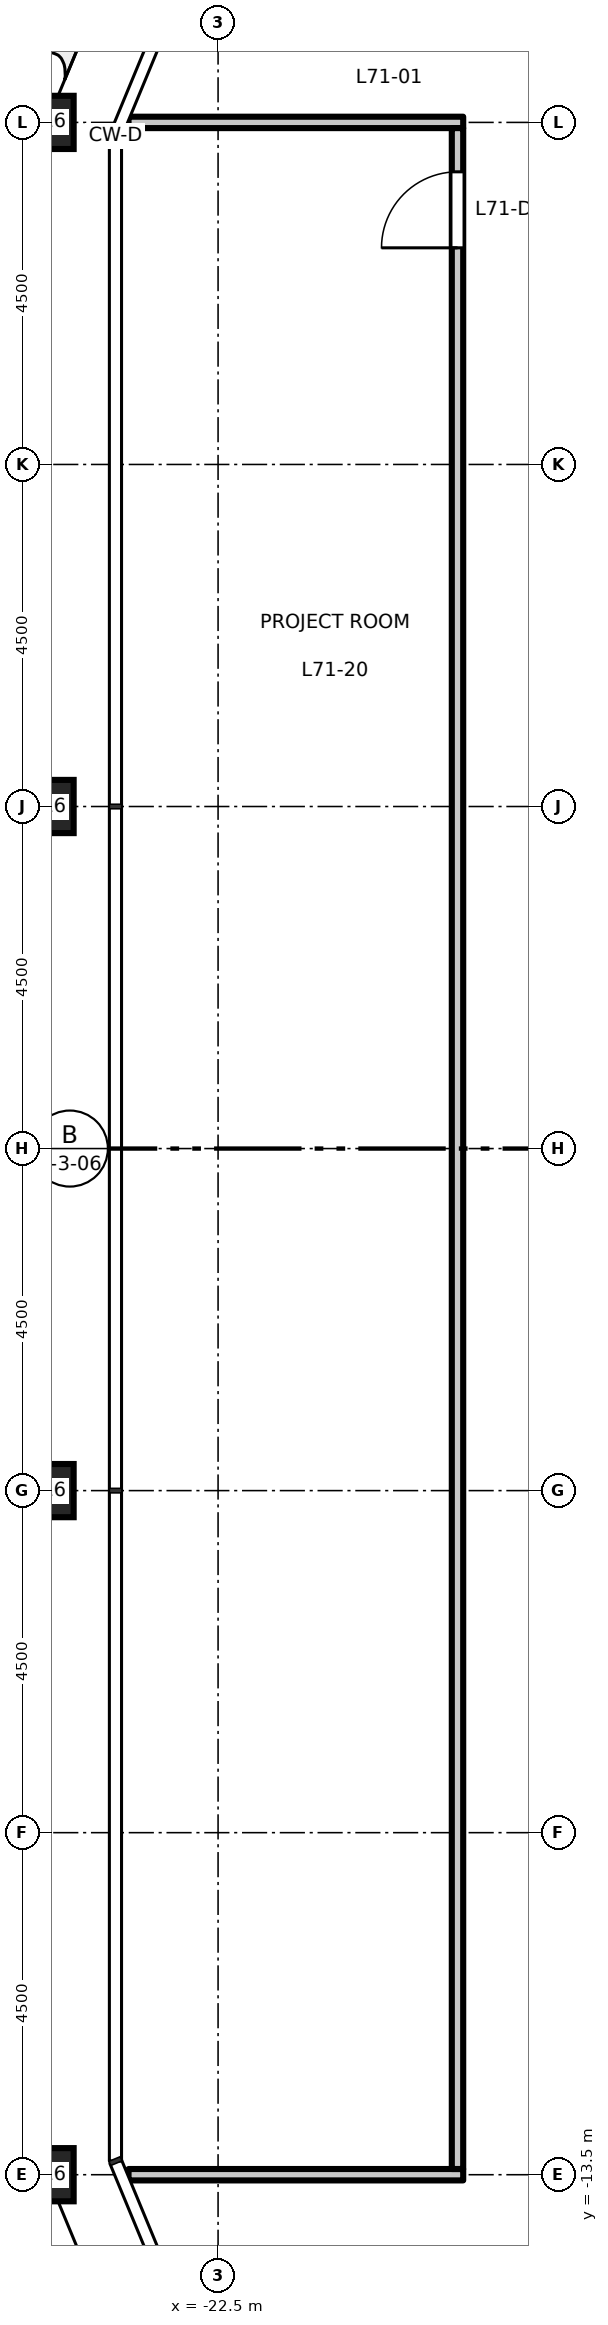
"""IFC4 building model, lengths in metres.
Left out: names, types, materials, properties, quantities, classifications, styles, units other than length and angle.
Written with IfcOpenShell. Run it as: python <this file> out.ifc"""

import sys

from ifc_helpers import new_model, si_unit, direction, frame, frame_2d, origin, origin_2d, place, context, subcontext, project, spatial, rectangle, hollow_rectangle, extrude, element, fill, save


model = new_model("IFC4")
c1 = context("Model", 3, precision=1e-05, world=origin(), true_north=direction((0.0, 1.0)))
c2 = subcontext(c1, "Body", "Model", "MODEL_VIEW")
j1 = project(units=[si_unit("LENGTHUNIT", "METRE"), si_unit("PLANEANGLEUNIT", "RADIAN")], contexts=[c1])
p1 = place(None, origin())
s1 = spatial("IfcSite", under=j1, at=p1, CompositionType="ELEMENT")
p2 = place(p1, origin())
s2 = spatial("IfcBuilding", under=s1, at=p2, CompositionType="ELEMENT")
p3 = place(p2, frame((0.0, 0.0, 330.2)))
s3 = spatial("IfcBuildingStorey", under=s2, at=p3, CompositionType="ELEMENT", Elevation=330.2)
for number, where, z_axis, x_axis in (
    (1, (-24.75, 13.5, 0.0), (0.0, 0.0, 1.0), (1.0, 0.0, 0.0)),
    (2, (-24.75, 4.5, 0.0), (0.0, 0.0, 1.0), (1.0, 0.0, 0.0)),
    (3, (-24.75, -4.5, 0.0), (0.0, 0.0, 1.0), (1.0, 0.0, 0.0)),
    (4, (-24.75, -13.5, 0.0), (0.0, 0.0, 1.0), (1.0, 0.0, 0.0)),
):
    element("IfcColumn", number, at=place(p3, frame(where, z_axis=z_axis, x_axis=x_axis)), inside=s3, PredefinedType="COLUMN", context=c2, shape_type="SweptSolid", body=[
        extrude(hollow_rectangle(XDim=0.7, YDim=0.7, WallThickness=0.036, at=origin_2d()), origin(), (0.0, 0.0, 1.0), 4.5),
    ])
for number, where, z_axis, x_axis in (
    (5, (-23.678, -13.5, 0.0), (0.0, 0.0, 1.0), (1.0, 0.0, 0.0)),
    (6, (-23.678, 13.5, 0.0), (0.0, 0.0, 1.0), (1.0, 0.0, 0.0)),
):
    element("IfcWall", number, at=place(p3, frame(where, z_axis=z_axis, x_axis=x_axis)), inside=s3, PredefinedType="PARTITIONING", context=c2, shape_type="SweptSolid", body=[
        extrude(rectangle(XDim=4.403, YDim=0.15, at=frame_2d((2.202, 0.0))), origin(), (0.0, 0.0, 1.0), 4.35),
    ])
p4 = place(p3, frame((-19.35, -13.425, 0.0), z_axis=(0.0, 0.0, 1.0), x_axis=(0.0, 1.0, 0.0)))
e7 = element("IfcWall", 7, at=p4, inside=s3, PredefinedType="PARTITIONING", context=c2, shape_type="SweptSolid", body=[
    extrude(rectangle(XDim=26.85, YDim=0.15, at=frame_2d((13.425, 0.0))), origin(), (0.0, 0.0, 1.0), 4.35),
])
p5 = place(p4, frame((25.275, 0.0, 0.0)))
e8 = element("IfcOpeningElement", 8, at=p5, cuts=e7, PredefinedType="OPENING", context=c2, shape_type="SweptSolid", body=[
    extrude(rectangle(XDim=1.0, YDim=2.1, at=frame_2d((0.5, 1.05))), frame((0.0, 0.085, 0.0), z_axis=(0.0, -1.0, 0.0), x_axis=(1.0, 0.0, 0.0)), (0.0, 0.0, 1.0), 0.17),
])
p6 = place(p5, origin())
e9 = element("IfcDoor", 9, at=p6, inside=s3, OperationType="SINGLE_SWING_LEFT", PredefinedType="DOOR", context=c2, shape_type="SweptSolid", body=[
    extrude(rectangle(XDim=1.0, YDim=2.1, at=frame_2d((0.5, 1.05))), frame((0.0, 0.025, 0.0), z_axis=(0.0, -1.0, 0.0), x_axis=(1.0, 0.0, 0.0)), (0.0, 0.0, 1.0), 0.05),
])
fill(e8, e9)
save(model, sys.argv[1])
